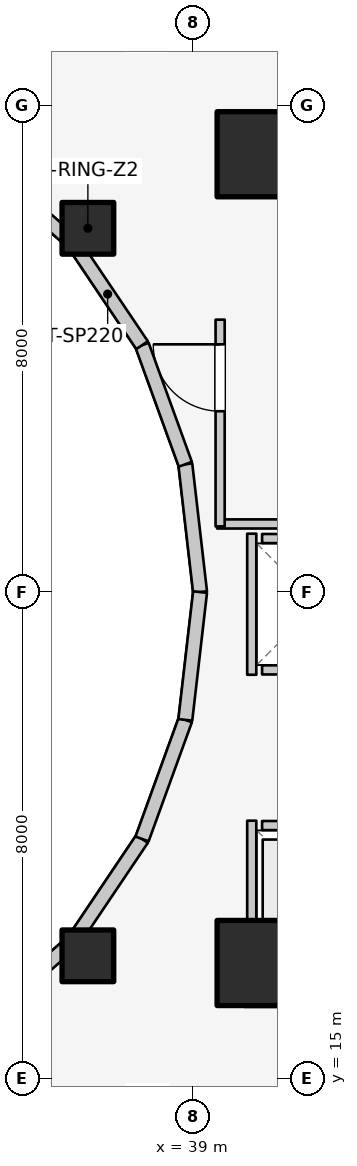
"""IFC4 building model, lengths in metres.
Left out: names, types, materials, properties, quantities, classifications, styles, units other than length and angle.
Written with IfcOpenShell. Run it as: python <this file> out.ifc"""

import sys

from ifc_helpers import new_model, si_unit, direction, frame, frame_2d, origin, origin_2d, place, context, subcontext, project, spatial, rectangle, extrude, element, fill, save


model = new_model("IFC4")
c1 = context("Model", 3, precision=1e-05, world=origin(), true_north=direction((0.0, 1.0)))
c2 = subcontext(c1, "Body", "Model", "MODEL_VIEW")
j1 = project(units=[si_unit("LENGTHUNIT", "METRE"), si_unit("PLANEANGLEUNIT", "RADIAN")], contexts=[c1])
p1 = place(None, origin())
s1 = spatial("IfcSite", under=j1, at=p1, CompositionType="ELEMENT")
p2 = place(p1, origin())
s2 = spatial("IfcBuilding", under=s1, at=p2, CompositionType="ELEMENT")
p3 = place(p2, frame((0.0, 0.0, 91.8)))
s3 = spatial("IfcBuildingStorey", under=s2, at=p3, CompositionType="ELEMENT", Elevation=91.8)
for number, where, z_axis, x_axis in (
    (1, (39.85, 16.55, 0.0), (0.0, 0.0, 1.0), (1.0, 0.0, 0.0)),
    (2, (39.85, 30.35, 0.0), (0.0, 0.0, 1.0), (1.0, 0.0, 0.0)),
):
    element("IfcWall", number, at=place(p3, frame(where, z_axis=z_axis, x_axis=x_axis)), inside=s3, PredefinedType="SHEAR", context=c2, shape_type="SweptSolid", body=[
        extrude(rectangle(XDim=4.5, YDim=0.7, at=frame_2d((2.25, 0.0))), origin(), (0.0, 0.0, 1.0), 3.1),
    ])
for number, where, z_axis, x_axis in (
    (3, (40.1, 16.9, 0.0), (0.0, 0.0, 1.0), (1.0, 0.0, 0.0)),
    (4, (40.1, 30.2, 0.0), (0.0, 0.0, 1.0), (1.0, 0.0, 0.0)),
):
    element("IfcColumn", number, at=place(p3, frame(where, z_axis=z_axis, x_axis=x_axis)), inside=s3, PredefinedType="COLUMN", context=c2, shape_type="SweptSolid", body=[
        extrude(rectangle(XDim=1.4, YDim=1.4, at=origin_2d()), origin(), (0.0, 0.0, 1.0), 3.1),
    ])
for number, where, z_axis, x_axis in (
    (5, (37.275, 28.982, 0.0), (0.0, 0.0, 1.0), (1.0, 0.0, 0.0)),
    (6, (37.275, 17.018, 0.0), (0.0, 0.0, 1.0), (1.0, 0.0, 0.0)),
):
    element("IfcColumn", number, at=place(p3, frame(where, z_axis=z_axis, x_axis=x_axis)), inside=s3, PredefinedType="COLUMN", context=c2, shape_type="SweptSolid", body=[
        extrude(rectangle(XDim=0.85, YDim=0.85, at=origin_2d()), origin(), (0.0, 0.0, 1.0), 3.1),
    ])
p4 = place(p3, frame((39.12, 23.0, 0.0), z_axis=(0.0, 0.0, 1.0), x_axis=(-0.114711713601, 0.993398823617, 0.0)))
e7 = element("IfcWall", 7, at=p4, inside=s3, PredefinedType="STANDARD", context=c2, shape_type="SweptSolid", body=[
    extrude(rectangle(XDim=2.115, YDim=0.23, at=frame_2d((1.058, 0.0))), origin(), (0.0, 0.0, 1.0), 2.56),
])
p5 = place(p3, frame((38.877, 25.102, 0.0), z_axis=(0.0, 0.0, 1.0), x_axis=(-0.341423187295, 0.93990968033, 0.0)))
e8 = element("IfcWall", 8, at=p5, inside=s3, PredefinedType="STANDARD", context=c2, shape_type="SweptSolid", body=[
    extrude(rectangle(XDim=2.084, YDim=0.23, at=frame_2d((1.042, 0.0))), origin(), (0.0, 0.0, 1.0), 2.56),
])
p6 = place(p3, frame((38.166, 27.06, 0.0), z_axis=(0.0, 0.0, 1.0), x_axis=(-0.558197800898, 0.829707909492, 0.0)))
e9 = element("IfcWall", 9, at=p6, inside=s3, PredefinedType="STANDARD", context=c2, shape_type="SweptSolid", body=[
    extrude(rectangle(XDim=2.027, YDim=0.23, at=frame_2d((1.013, 0.0))), origin(), (0.0, 0.0, 1.0), 1.22),
])
for number, where, z_axis, x_axis in (
    (10, (37.035, 28.742, 0.0), (0.0, 0.0, 1.0), (-0.753, 0.659, 0.0)),
    (11, (35.56, 15.968, 0.0), (0.0, 0.0, 1.0), (0.753, 0.659, 0.0)),
):
    element("IfcWall", number, at=place(p3, frame(where, z_axis=z_axis, x_axis=x_axis)), inside=s3, PredefinedType="STANDARD", context=c2, shape_type="SweptSolid", body=[
        extrude(rectangle(XDim=1.959, YDim=0.23, at=frame_2d((0.98, 0.0))), origin(), (0.0, 0.0, 1.0), 1.22),
    ])
p7 = place(p3, frame((37.035, 17.258, 0.0), z_axis=(0.0, 0.0, 1.0), x_axis=(0.558197800898, 0.829707909492, 0.0)))
e12 = element("IfcWall", 12, at=p7, inside=s3, PredefinedType="STANDARD", context=c2, shape_type="SweptSolid", body=[
    extrude(rectangle(XDim=2.027, YDim=0.23, at=frame_2d((1.013, 0.0))), origin(), (0.0, 0.0, 1.0), 1.22),
])
p8 = place(p3, frame((38.166, 18.94, 0.0), z_axis=(0.0, 0.0, 1.0), x_axis=(0.341423187295, 0.93990968033, 0.0)))
e13 = element("IfcWall", 13, at=p8, inside=s3, PredefinedType="STANDARD", context=c2, shape_type="SweptSolid", body=[
    extrude(rectangle(XDim=2.084, YDim=0.23, at=frame_2d((1.042, 0.0))), origin(), (0.0, 0.0, 1.0), 2.56),
])
p9 = place(p3, frame((38.877, 20.898, 0.0), z_axis=(0.0, 0.0, 1.0), x_axis=(0.114711713601, 0.993398823617, 0.0)))
e14 = element("IfcWall", 14, at=p9, inside=s3, PredefinedType="STANDARD", context=c2, shape_type="SweptSolid", body=[
    extrude(rectangle(XDim=2.115, YDim=0.23, at=frame_2d((1.058, 0.0))), origin(), (0.0, 0.0, 1.0), 2.56),
])
p10 = place(p3, frame((40.14, 19.16, 0.0), z_axis=(0.0, 0.0, 1.0), x_axis=(1.0, 0.0, 0.0)))
e15 = element("IfcWall", 15, at=p10, inside=s3, PredefinedType="SOLIDWALL", context=c2, shape_type="SweptSolid", body=[
    extrude(rectangle(XDim=1.82, YDim=0.15, at=frame_2d((0.91, 0.0))), origin(), (0.0, 0.0, 1.0), 2.12),
])
p11 = place(p10, frame((0.36, 0.0, 0.0)))
e16 = element("IfcOpeningElement", 16, at=p11, cuts=e15, PredefinedType="OPENING", context=c2, shape_type="SweptSolid", body=[
    extrude(rectangle(XDim=1.1, YDim=2.1, at=frame_2d((0.55, 1.05))), frame((0.0, 0.085, 0.0), z_axis=(0.0, -1.0, 0.0), x_axis=(1.0, 0.0, 0.0)), (0.0, 0.0, 1.0), 0.17),
])
p12 = place(p3, frame((40.14, 17.1, 0.0), z_axis=(0.0, 0.0, 1.0), x_axis=(1.0, 0.0, 0.0)))
e17 = element("IfcWall", 17, at=p12, inside=s3, PredefinedType="SOLIDWALL", context=c2, shape_type="SweptSolid", body=[
    extrude(rectangle(XDim=1.82, YDim=0.15, at=frame_2d((0.91, 0.0))), origin(), (0.0, 0.0, 1.0), 2.12),
])
p13 = place(p3, frame((39.97, 17.02, 0.0), z_axis=(0.0, 0.0, 1.0), x_axis=(0.0, 1.0, 0.0)))
e18 = element("IfcWall", 18, at=p13, inside=s3, PredefinedType="SOLIDWALL", context=c2, shape_type="SweptSolid", body=[
    extrude(rectangle(XDim=2.22, YDim=0.15, at=frame_2d((1.11, 0.0))), origin(), (0.0, 0.0, 1.0), 1.873),
])
for number, where, z_axis, x_axis in (
    (19, (40.14, 21.72, 0.0), (0.0, 0.0, 1.0), (1.0, 0.0, 0.0)),
    (20, (40.14, 23.88, 0.0), (0.0, 0.0, 1.0), (1.0, 0.0, 0.0)),
):
    element("IfcWall", number, at=place(p3, frame(where, z_axis=z_axis, x_axis=x_axis)), inside=s3, PredefinedType="SOLIDWALL", context=c2, shape_type="SweptSolid", body=[
        extrude(rectangle(XDim=1.82, YDim=0.15, at=frame_2d((0.91, 0.0))), origin(), (0.0, 0.0, 1.0), 2.12),
    ])
p14 = place(p3, frame((39.97, 21.64, 0.0), z_axis=(0.0, 0.0, 1.0), x_axis=(0.0, 1.0, 0.0)))
e21 = element("IfcWall", 21, at=p14, inside=s3, PredefinedType="SOLIDWALL", context=c2, shape_type="SweptSolid", body=[
    extrude(rectangle(XDim=2.32, YDim=0.15, at=frame_2d((1.16, 0.0))), origin(), (0.0, 0.0, 1.0), 2.12),
])
p15 = place(p3, frame((39.4, 24.12, 0.0), z_axis=(0.0, 0.0, 1.0), x_axis=(1.0, 0.0, 0.0)))
e22 = element("IfcWall", 22, at=p15, inside=s3, PredefinedType="PARTITIONING", context=c2, shape_type="SweptSolid", body=[
    extrude(rectangle(XDim=5.08, YDim=0.15, at=frame_2d((2.54, 0.0))), origin(), (0.0, 0.0, 1.0), 2.12),
])
p16 = place(p3, frame((39.45, 24.08, 0.0), z_axis=(0.0, 0.0, 1.0), x_axis=(0.0, 1.0, 0.0)))
e23 = element("IfcWall", 23, at=p16, inside=s3, PredefinedType="PARTITIONING", context=c2, shape_type="SweptSolid", body=[
    extrude(rectangle(XDim=3.4, YDim=0.15, at=frame_2d((1.7, 0.0))), origin(), (0.0, 0.0, 1.0), 2.575),
])
p17 = place(p16, frame((1.894, 0.0, 0.0)))
e24 = element("IfcOpeningElement", 24, at=p17, cuts=e23, PredefinedType="OPENING", context=c2, shape_type="SweptSolid", body=[
    extrude(rectangle(XDim=1.1, YDim=2.1, at=frame_2d((0.55, 1.05))), frame((0.0, 0.085, 0.0), z_axis=(0.0, -1.0, 0.0), x_axis=(1.0, 0.0, 0.0)), (0.0, 0.0, 1.0), 0.17),
])
p18 = place(p17, origin())
e25 = element("IfcDoor", 25, at=p18, inside=s3, OperationType="SINGLE_SWING_RIGHT", PredefinedType="DOOR", context=c2, shape_type="SweptSolid", body=[
    extrude(rectangle(XDim=1.1, YDim=2.1, at=frame_2d((0.55, 1.05))), frame((0.0, 0.025, 0.0), z_axis=(0.0, -1.0, 0.0), x_axis=(1.0, 0.0, 0.0)), (0.0, 0.0, 1.0), 0.05),
])
fill(e24, e25)
save(model, sys.argv[1])
